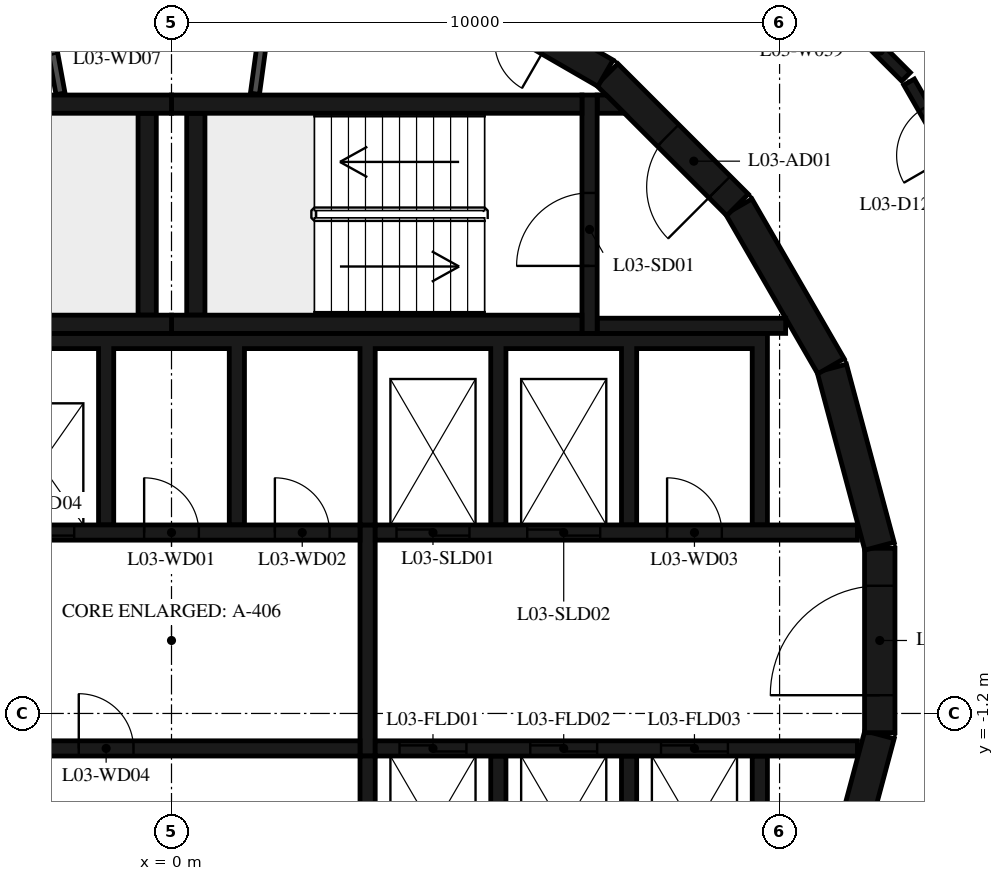
"""IFC4 building model, lengths in metres.
Left out: names, types, materials, properties, quantities, classifications, styles, units other than length and angle.
Written with IfcOpenShell. Run it as: python <this file> out.ifc"""

import sys

from ifc_helpers import new_model, si_unit, direction, frame, frame_2d, origin, place, context, subcontext, project, spatial, polyline, rectangle, outline, extrude, element, fill, save


model = new_model("IFC4")
c1 = context("Model", 3, precision=1e-05, world=origin(), true_north=direction((0.0, 1.0)))
c2 = subcontext(c1, "Body", "Model", "MODEL_VIEW")
j1 = project(units=[si_unit("LENGTHUNIT", "METRE"), si_unit("PLANEANGLEUNIT", "RADIAN")], contexts=[c1])
p1 = place(None, origin())
s1 = spatial("IfcSite", under=j1, at=p1, CompositionType="ELEMENT")
p2 = place(p1, origin())
s2 = spatial("IfcBuilding", under=s1, at=p2, CompositionType="ELEMENT")
p3 = place(p2, frame((0.0, 0.0, 18.6)))
s3 = spatial("IfcBuildingStorey", under=s2, at=p3, CompositionType="ELEMENT", Elevation=18.6)
p4 = place(p3, frame((10.858, -4.479, 0.0), z_axis=(0.0, 0.0, 1.0), x_axis=(0.258734743916, 0.965948410781, 0.0)))
e1 = element("IfcWall", 1, at=p4, inside=s3, PredefinedType="SHEAR", context=c2, shape_type="SweptSolid", body=[
    extrude(rectangle(XDim=3.033, YDim=0.5, at=frame_2d((1.516, 0.0))), origin(), (0.0, 0.0, 1.0), 4.42),
])
p5 = place(p3, frame((11.647, -1.516, 0.0), z_axis=(0.0, 0.0, 1.0), x_axis=(0.0, 1.0, 0.0)))
e2 = element("IfcWall", 2, at=p5, inside=s3, PredefinedType="SHEAR", context=c2, shape_type="SweptSolid", body=[
    extrude(rectangle(XDim=3.033, YDim=0.5, at=frame_2d((1.516, 0.0))), origin(), (0.0, 0.0, 1.0), 4.42),
])
p6 = place(p5, frame((0.616, 0.0, 0.0)))
e3 = element("IfcOpeningElement", 3, at=p6, cuts=e2, PredefinedType="OPENING", context=c2, shape_type="SweptSolid", body=[
    extrude(rectangle(XDim=1.8, YDim=2.1, at=frame_2d((0.9, 1.05))), frame((0.0, 0.26, 0.0), z_axis=(0.0, -1.0, 0.0), x_axis=(1.0, 0.0, 0.0)), (0.0, 0.0, 1.0), 0.52),
])
for number, where, z_axis, x_axis in (
    (4, (11.643, 1.55, 0.0), (0.0, 0.0, 1.0), (-0.259, 0.966, 0.0)),
    (5, (10.845, 4.51, 0.0), (0.0, 0.0, 1.0), (-0.5, 0.866, 0.0)),
):
    element("IfcWall", number, at=place(p3, frame(where, z_axis=z_axis, x_axis=x_axis)), inside=s3, PredefinedType="SHEAR", context=c2, shape_type="SweptSolid", body=[
        extrude(rectangle(XDim=3.033, YDim=0.5, at=frame_2d((1.516, 0.0))), origin(), (0.0, 0.0, 1.0), 4.42),
    ])
p7 = place(p3, frame((9.308, 7.164, 0.0), z_axis=(0.0, 0.0, 1.0), x_axis=(-0.707106781187, 0.707106781187, 0.0)))
e6 = element("IfcWall", 6, at=p7, inside=s3, PredefinedType="SHEAR", context=c2, shape_type="SweptSolid", body=[
    extrude(rectangle(XDim=3.032, YDim=0.5, at=frame_2d((1.516, 0.0))), origin(), (0.0, 0.0, 1.0), 4.42),
])
p8 = place(p7, frame((0.416, 0.0, 0.0)))
e7 = element("IfcOpeningElement", 7, at=p8, cuts=e6, PredefinedType="OPENING", context=c2, shape_type="SweptSolid", body=[
    extrude(rectangle(XDim=1.2, YDim=2.1, at=frame_2d((0.6, 1.05))), frame((0.0, 0.26, 0.0), z_axis=(0.0, -1.0, 0.0), x_axis=(1.0, 0.0, 0.0)), (0.0, 0.0, 1.0), 0.52),
])
p9 = place(p3, frame((7.137, 9.329, 0.0), z_axis=(0.0, 0.0, 1.0), x_axis=(-0.865975092491, 0.500087131594, 0.0)))
e8 = element("IfcWall", 8, at=p9, inside=s3, PredefinedType="SHEAR", context=c2, shape_type="SweptSolid", body=[
    extrude(rectangle(XDim=3.033, YDim=0.5, at=frame_2d((1.516, 0.0))), origin(), (0.0, 0.0, 1.0), 4.42),
])
p10 = place(p9, frame((1.066, 0.0, 0.0)))
e9 = element("IfcOpeningElement", 9, at=p10, cuts=e8, PredefinedType="OPENING", context=c2, shape_type="SweptSolid", body=[
    extrude(rectangle(XDim=0.9, YDim=2.1, at=frame_2d((0.45, 1.05))), frame((0.0, 0.26, 0.0), z_axis=(0.0, -1.0, 0.0), x_axis=(1.0, 0.0, 0.0)), (0.0, 0.0, 1.0), 0.52),
])
for number, where, z_axis, x_axis in (
    (10, (0.0, 5.2, 0.0), (0.0, 0.0, 1.0), (1.0, 0.0, 0.0)),
    (11, (0.0, 8.82, 0.0), (0.0, 0.0, 1.0), (1.0, 0.0, 0.0)),
):
    element("IfcWall", number, at=place(p3, frame(where, z_axis=z_axis, x_axis=x_axis)), inside=s3, PredefinedType="SHEAR", context=c2, shape_type="SweptSolid", body=[
        extrude(rectangle(XDim=6.75, YDim=0.3, at=frame_2d((3.375, 0.0))), origin(), (0.0, 0.0, 1.0), 4.42),
    ])
p11 = place(p3, frame((0.4, 5.35, 0.0), z_axis=(0.0, 0.0, 1.0), x_axis=(0.0, 1.0, 0.0)))
e12 = element("IfcWall", 12, at=p11, inside=s3, PredefinedType="SHEAR", context=c2, shape_type="SweptSolid", body=[
    extrude(rectangle(XDim=3.32, YDim=0.3, at=frame_2d((1.66, 0.0))), origin(), (0.0, 0.0, 1.0), 4.42),
])
p12 = place(p3, frame((6.875, 5.05, 0.0), z_axis=(0.0, 0.0, 1.0), x_axis=(0.0, 1.0, 0.0)))
e13 = element("IfcWall", 13, at=p12, inside=s3, PredefinedType="SHEAR", context=c2, shape_type="SweptSolid", body=[
    extrude(rectangle(XDim=3.92, YDim=0.25, at=frame_2d((1.96, 0.0))), origin(), (0.0, 0.0, 1.0), 4.42),
])
p13 = place(p12, frame((1.11, 0.0, 0.0)))
e14 = element("IfcOpeningElement", 14, at=p13, cuts=e13, PredefinedType="OPENING", context=c2, shape_type="SweptSolid", body=[
    extrude(rectangle(XDim=1.2, YDim=2.1, at=frame_2d((0.6, 1.05))), frame((0.0, 0.135, 0.0), z_axis=(0.0, -1.0, 0.0), x_axis=(1.0, 0.0, 0.0)), (0.0, 0.0, 1.0), 0.27),
])
p14 = place(p3, frame((7.0, 5.175, 0.0), z_axis=(0.0, 0.0, 1.0), x_axis=(1.0, 0.0, 0.0)))
e15 = element("IfcWall", 15, at=p14, inside=s3, PredefinedType="SHEAR", context=c2, shape_type="SweptSolid", body=[
    extrude(rectangle(XDim=3.1, YDim=0.25, at=frame_2d((1.55, 0.0))), origin(), (0.0, 0.0, 1.0), 4.42),
])
p15 = place(p3, origin())
e16 = element("IfcWall", 16, at=p15, inside=s3, PredefinedType="SHEAR", context=c2, shape_type="SweptSolid", body=[
    extrude(outline(polyline([(7.448, 8.67), (7.0, 8.67), (7.0, 8.97), (7.148, 8.97), (7.448, 8.67)])), origin(), (0.0, 0.0, 1.0), 4.42),
])
for number, where, z_axis, x_axis in (
    (17, (-6.75, 5.2, 0.0), (0.0, 0.0, 1.0), (1.0, 0.0, 0.0)),
    (18, (-6.75, 8.82, 0.0), (0.0, 0.0, 1.0), (1.0, 0.0, 0.0)),
):
    element("IfcWall", number, at=place(p3, frame(where, z_axis=z_axis, x_axis=x_axis)), inside=s3, PredefinedType="SHEAR", context=c2, shape_type="SweptSolid", body=[
        extrude(rectangle(XDim=6.75, YDim=0.3, at=frame_2d((3.375, 0.0))), origin(), (0.0, 0.0, 1.0), 4.42),
    ])
p16 = place(p3, frame((-0.4, 5.35, 0.0), z_axis=(0.0, 0.0, 1.0), x_axis=(0.0, 1.0, 0.0)))
e19 = element("IfcWall", 19, at=p16, inside=s3, PredefinedType="SHEAR", context=c2, shape_type="SweptSolid", body=[
    extrude(rectangle(XDim=3.32, YDim=0.3, at=frame_2d((1.66, 0.0))), origin(), (0.0, 0.0, 1.0), 4.42),
])
p17 = place(p3, origin())
e20 = element("IfcWall", 20, at=p17, inside=s3, PredefinedType="SHEAR", context=c2, shape_type="SweptSolid", body=[
    extrude(outline(polyline([(-9.55, 4.8), (-7.65, 4.8), (-7.65, 1.9), (-7.4, 1.9), (-7.4, 4.8), (-5.5, 4.8), (-5.5, 1.9), (-5.25, 1.9), (-5.25, 4.8), (-3.35, 4.8), (-3.35, 1.9), (-3.1, 1.9), (-3.1, 4.8), (-1.2, 4.8), (-1.2, 1.9), (-0.95, 1.9), (-0.95, 4.8), (0.95, 4.8), (0.95, 1.9), (1.2, 1.9), (1.2, 4.8), (3.1, 4.8), (3.1, 1.9), (3.35, 1.9), (3.35, 4.8), (5.25, 4.8), (5.25, 1.9), (5.5, 1.9), (5.5, 4.8), (7.4, 4.8), (7.4, 1.9), (7.65, 1.9), (7.65, 4.8), (9.55, 4.8), (9.55, 1.9), (9.8, 1.9), (9.8, 4.8), (9.8, 5.05), (-9.8, 5.05), (-9.8, 4.8), (-9.8, 1.9), (-9.55, 1.9), (-9.55, 4.8)])), origin(), (0.0, 0.0, 1.0), 4.42),
])
p18 = place(p3, origin())
e21 = element("IfcWall", 21, at=p18, inside=s3, PredefinedType="SHEAR", context=c2, shape_type="SweptSolid", body=[
    extrude(outline(polyline([(9.8, -5.05), (9.8, -4.8), (9.8, -1.9), (9.55, -1.9), (9.55, -4.8), (7.65, -4.8), (7.65, -1.9), (7.4, -1.9), (7.4, -4.8), (5.5, -4.8), (5.5, -1.9), (5.25, -1.9), (5.25, -4.8), (3.35, -4.8), (3.35, -1.9), (3.1, -1.9), (3.1, -4.8), (-5.25, -4.8), (-5.25, -1.9), (-5.5, -1.9), (-5.5, -4.8), (-7.4, -4.8), (-7.4, -1.9), (-7.65, -1.9), (-7.65, -4.8), (-9.55, -4.8), (-9.55, -1.9), (-9.8, -1.9), (-9.8, -4.8), (-9.8, -5.05), (9.8, -5.05)])), origin(), (0.0, 0.0, 1.0), 4.42),
])
p19 = place(p3, frame((-11.28, 1.775, 0.0), z_axis=(0.0, 0.0, 1.0), x_axis=(1.0, 0.0, 0.0)))
e22 = element("IfcWall", 22, at=p19, inside=s3, PredefinedType="SHEAR", context=c2, shape_type="SweptSolid", body=[
    extrude(rectangle(XDim=14.38, YDim=0.25, at=frame_2d((7.19, 0.0))), origin(), (0.0, 0.0, 1.0), 4.42),
])
p20 = place(p19, frame((2.13, 0.0, 0.0)))
e23 = element("IfcOpeningElement", 23, at=p20, cuts=e22, PredefinedType="OPENING", context=c2, shape_type="SweptSolid", body=[
    extrude(rectangle(XDim=1.1, YDim=2.1, at=frame_2d((0.55, 1.05))), frame((0.0, 0.135, 0.0), z_axis=(0.0, -1.0, 0.0), x_axis=(1.0, 0.0, 0.0)), (0.0, 0.0, 1.0), 0.27),
])
p21 = place(p19, frame((4.28, 0.0, 0.0)))
e24 = element("IfcOpeningElement", 24, at=p21, cuts=e22, PredefinedType="OPENING", context=c2, shape_type="SweptSolid", body=[
    extrude(rectangle(XDim=1.1, YDim=2.1, at=frame_2d((0.55, 1.05))), frame((0.0, 0.135, 0.0), z_axis=(0.0, -1.0, 0.0), x_axis=(1.0, 0.0, 0.0)), (0.0, 0.0, 1.0), 0.27),
])
p22 = place(p19, frame((6.43, 0.0, 0.0)))
e25 = element("IfcOpeningElement", 25, at=p22, cuts=e22, PredefinedType="OPENING", context=c2, shape_type="SweptSolid", body=[
    extrude(rectangle(XDim=1.1, YDim=2.1, at=frame_2d((0.55, 1.05))), frame((0.0, 0.135, 0.0), z_axis=(0.0, -1.0, 0.0), x_axis=(1.0, 0.0, 0.0)), (0.0, 0.0, 1.0), 0.27),
])
p23 = place(p19, frame((8.58, 0.0, 0.0)))
e26 = element("IfcOpeningElement", 26, at=p23, cuts=e22, PredefinedType="OPENING", context=c2, shape_type="SweptSolid", body=[
    extrude(rectangle(XDim=1.1, YDim=2.1, at=frame_2d((0.55, 1.05))), frame((0.0, 0.135, 0.0), z_axis=(0.0, -1.0, 0.0), x_axis=(1.0, 0.0, 0.0)), (0.0, 0.0, 1.0), 0.27),
])
p24 = place(p19, frame((10.83, 0.0, 0.0)))
e27 = element("IfcOpeningElement", 27, at=p24, cuts=e22, PredefinedType="OPENING", context=c2, shape_type="SweptSolid", body=[
    extrude(rectangle(XDim=0.9, YDim=2.1, at=frame_2d((0.45, 1.05))), frame((0.0, 0.135, 0.0), z_axis=(0.0, -1.0, 0.0), x_axis=(1.0, 0.0, 0.0)), (0.0, 0.0, 1.0), 0.27),
])
p25 = place(p19, frame((12.98, 0.0, 0.0)))
e28 = element("IfcOpeningElement", 28, at=p25, cuts=e22, PredefinedType="OPENING", context=c2, shape_type="SweptSolid", body=[
    extrude(rectangle(XDim=0.9, YDim=2.1, at=frame_2d((0.45, 1.05))), frame((0.0, 0.135, 0.0), z_axis=(0.0, -1.0, 0.0), x_axis=(1.0, 0.0, 0.0)), (0.0, 0.0, 1.0), 0.27),
])
p26 = place(p3, frame((3.35, 1.775, 0.0), z_axis=(0.0, 0.0, 1.0), x_axis=(1.0, 0.0, 0.0)))
e29 = element("IfcWall", 29, at=p26, inside=s3, PredefinedType="SHEAR", context=c2, shape_type="SweptSolid", body=[
    extrude(rectangle(XDim=7.93, YDim=0.25, at=frame_2d((3.965, 0.0))), origin(), (0.0, 0.0, 1.0), 4.42),
])
p27 = place(p26, frame((0.35, 0.0, 0.0)))
e30 = element("IfcOpeningElement", 30, at=p27, cuts=e29, PredefinedType="OPENING", context=c2, shape_type="SweptSolid", body=[
    extrude(rectangle(XDim=1.2, YDim=2.4, at=frame_2d((0.6, 1.2))), frame((0.0, 0.135, 0.0), z_axis=(0.0, -1.0, 0.0), x_axis=(1.0, 0.0, 0.0)), (0.0, 0.0, 1.0), 0.27),
])
p28 = place(p26, frame((2.5, 0.0, 0.0)))
e31 = element("IfcOpeningElement", 31, at=p28, cuts=e29, PredefinedType="OPENING", context=c2, shape_type="SweptSolid", body=[
    extrude(rectangle(XDim=1.2, YDim=2.4, at=frame_2d((0.6, 1.2))), frame((0.0, 0.135, 0.0), z_axis=(0.0, -1.0, 0.0), x_axis=(1.0, 0.0, 0.0)), (0.0, 0.0, 1.0), 0.27),
])
p29 = place(p26, frame((4.8, 0.0, 0.0)))
e32 = element("IfcOpeningElement", 32, at=p29, cuts=e29, PredefinedType="OPENING", context=c2, shape_type="SweptSolid", body=[
    extrude(rectangle(XDim=0.9, YDim=2.1, at=frame_2d((0.45, 1.05))), frame((0.0, 0.135, 0.0), z_axis=(0.0, -1.0, 0.0), x_axis=(1.0, 0.0, 0.0)), (0.0, 0.0, 1.0), 0.27),
])
p30 = place(p3, frame((-11.28, -1.775, 0.0), z_axis=(0.0, 0.0, 1.0), x_axis=(1.0, 0.0, 0.0)))
e33 = element("IfcWall", 33, at=p30, inside=s3, PredefinedType="SHEAR", context=c2, shape_type="SweptSolid", body=[
    extrude(rectangle(XDim=14.38, YDim=0.25, at=frame_2d((7.19, 0.0))), origin(), (0.0, 0.0, 1.0), 4.42),
])
p31 = place(p30, frame((9.755, 0.0, 0.0)))
e34 = element("IfcOpeningElement", 34, at=p31, cuts=e33, PredefinedType="OPENING", context=c2, shape_type="SweptSolid", body=[
    extrude(rectangle(XDim=0.9, YDim=2.1, at=frame_2d((0.45, 1.05))), frame((0.0, 0.135, 0.0), z_axis=(0.0, -1.0, 0.0), x_axis=(1.0, 0.0, 0.0)), (0.0, 0.0, 1.0), 0.27),
])
p32 = place(p3, frame((3.35, -1.775, 0.0), z_axis=(0.0, 0.0, 1.0), x_axis=(1.0, 0.0, 0.0)))
e35 = element("IfcWall", 35, at=p32, inside=s3, PredefinedType="SHEAR", context=c2, shape_type="SweptSolid", body=[
    extrude(rectangle(XDim=7.93, YDim=0.25, at=frame_2d((3.965, 0.0))), origin(), (0.0, 0.0, 1.0), 4.42),
])
p33 = place(p32, frame((0.4, 0.0, 0.0)))
e36 = element("IfcOpeningElement", 36, at=p33, cuts=e35, PredefinedType="OPENING", context=c2, shape_type="SweptSolid", body=[
    extrude(rectangle(XDim=1.1, YDim=2.4, at=frame_2d((0.55, 1.2))), frame((0.0, 0.135, 0.0), z_axis=(0.0, -1.0, 0.0), x_axis=(1.0, 0.0, 0.0)), (0.0, 0.0, 1.0), 0.27),
])
p34 = place(p32, frame((2.55, 0.0, 0.0)))
e37 = element("IfcOpeningElement", 37, at=p34, cuts=e35, PredefinedType="OPENING", context=c2, shape_type="SweptSolid", body=[
    extrude(rectangle(XDim=1.1, YDim=2.4, at=frame_2d((0.55, 1.2))), frame((0.0, 0.135, 0.0), z_axis=(0.0, -1.0, 0.0), x_axis=(1.0, 0.0, 0.0)), (0.0, 0.0, 1.0), 0.27),
])
p35 = place(p32, frame((4.7, 0.0, 0.0)))
e38 = element("IfcOpeningElement", 38, at=p35, cuts=e35, PredefinedType="OPENING", context=c2, shape_type="SweptSolid", body=[
    extrude(rectangle(XDim=1.1, YDim=2.4, at=frame_2d((0.55, 1.2))), frame((0.0, 0.135, 0.0), z_axis=(0.0, -1.0, 0.0), x_axis=(1.0, 0.0, 0.0)), (0.0, 0.0, 1.0), 0.27),
])
p36 = place(p3, frame((3.225, -1.9, 0.0), z_axis=(0.0, 0.0, 1.0), x_axis=(0.0, 1.0, 0.0)))
e39 = element("IfcWall", 39, at=p36, inside=s3, PredefinedType="SHEAR", context=c2, shape_type="SweptSolid", body=[
    extrude(rectangle(XDim=3.8, YDim=0.25, at=frame_2d((1.9, 0.0))), origin(), (0.0, 0.0, 1.0), 4.42),
])
p37 = place(p3, frame((1.691, 11.326, 0.0), z_axis=(0.0, 0.0, 1.0), x_axis=(-0.135344253201, -0.990798633994, 0.0)))
e40 = element("IfcWall", 40, at=p37, inside=s3, PredefinedType="PARTITIONING", context=c2, shape_type="SweptSolid", body=[
    extrude(rectangle(XDim=2.358, YDim=0.15, at=frame_2d((1.179, 0.0))), origin(), (0.0, 0.0, 1.0), 4.42),
])
p38 = place(p37, frame((0.729, 0.0, 0.0)))
e41 = element("IfcOpeningElement", 41, at=p38, cuts=e40, PredefinedType="OPENING", context=c2, shape_type="SweptSolid", body=[
    extrude(rectangle(XDim=0.9, YDim=2.1, at=frame_2d((0.45, 1.05))), frame((0.0, 0.085, 0.0), z_axis=(0.0, -1.0, 0.0), x_axis=(1.0, 0.0, 0.0)), (0.0, 0.0, 1.0), 0.17),
])
p39 = place(p3, frame((-1.825, 8.99, 0.0), z_axis=(0.0, 0.0, 1.0), x_axis=(-0.179955206115, 0.983674805915, 0.0)))
e42 = element("IfcWall", 42, at=p39, inside=s3, PredefinedType="PARTITIONING", context=c2, shape_type="SweptSolid", body=[
    extrude(rectangle(XDim=2.229, YDim=0.15, at=frame_2d((1.115, 0.0))), origin(), (0.0, 0.0, 1.0), 4.42),
])
p40 = place(p39, frame((0.665, 0.0, 0.0)))
e43 = element("IfcOpeningElement", 43, at=p40, cuts=e42, PredefinedType="OPENING", context=c2, shape_type="SweptSolid", body=[
    extrude(rectangle(XDim=0.9, YDim=2.1, at=frame_2d((0.45, 1.05))), frame((0.0, 0.085, 0.0), z_axis=(0.0, -1.0, 0.0), x_axis=(1.0, 0.0, 0.0)), (0.0, 0.0, 1.0), 0.17),
])
p41 = place(p3, frame((12.08, 9.27, 0.0), z_axis=(0.0, 0.0, 1.0), x_axis=(-0.707106781187, 0.707106781187, 0.0)))
e44 = element("IfcWall", 44, at=p41, inside=s3, PredefinedType="PARTITIONING", context=c2, shape_type="SweptSolid", body=[
    extrude(rectangle(XDim=1.202, YDim=0.2, at=frame_2d((0.601, 0.0))), origin(), (0.0, 0.0, 1.0), 4.42),
])
p42 = place(p3, frame((13.07, 7.55, 0.0), z_axis=(0.0, 0.0, 1.0), x_axis=(-0.498884838469, 0.866668285993, 0.0)))
e45 = element("IfcWall", 45, at=p42, inside=s3, PredefinedType="PARTITIONING", context=c2, shape_type="SweptSolid", body=[
    extrude(rectangle(XDim=1.885, YDim=0.2, at=frame_2d((0.942, 0.0))), origin(), (0.0, 0.0, 1.0), 4.42),
])
p43 = place(p42, frame((0.492, 0.0, 0.0)))
e46 = element("IfcOpeningElement", 46, at=p43, cuts=e45, PredefinedType="OPENING", context=c2, shape_type="SweptSolid", body=[
    extrude(rectangle(XDim=0.9, YDim=2.1, at=frame_2d((0.45, 1.05))), frame((0.0, 0.11, 0.0), z_axis=(0.0, -1.0, 0.0), x_axis=(1.0, 0.0, 0.0)), (0.0, 0.0, 1.0), 0.22),
])
p44 = place(p13, origin())
e47 = element("IfcDoor", 47, at=p44, inside=s3, OperationType="SINGLE_SWING_LEFT", PredefinedType="DOOR", context=c2, shape_type="SweptSolid", body=[
    extrude(rectangle(XDim=1.2, YDim=2.1, at=frame_2d((0.6, 1.05))), frame((0.0, 0.025, 0.0), z_axis=(0.0, -1.0, 0.0), x_axis=(1.0, 0.0, 0.0)), (0.0, 0.0, 1.0), 0.05),
])
fill(e14, e47)
p45 = place(p8, origin())
e48 = element("IfcDoor", 48, at=p45, inside=s3, OperationType="SINGLE_SWING_RIGHT", PredefinedType="DOOR", context=c2, shape_type="SweptSolid", body=[
    extrude(rectangle(XDim=1.2, YDim=2.1, at=frame_2d((0.6, 1.05))), frame((0.0, 0.025, 0.0), z_axis=(0.0, -1.0, 0.0), x_axis=(1.0, 0.0, 0.0)), (0.0, 0.0, 1.0), 0.05),
])
fill(e7, e48)
p46 = place(p6, origin())
e49 = element("IfcDoor", 49, at=p46, inside=s3, OperationType="DOUBLE_DOOR_SINGLE_SWING", PredefinedType="DOOR", context=c2, shape_type="SweptSolid", body=[
    extrude(rectangle(XDim=1.8, YDim=2.1, at=frame_2d((0.9, 1.05))), frame((0.0, 0.025, 0.0), z_axis=(0.0, -1.0, 0.0), x_axis=(1.0, 0.0, 0.0)), (0.0, 0.0, 1.0), 0.05),
])
fill(e3, e49)
p47 = place(p23, origin())
e50 = element("IfcDoor", 50, at=p47, inside=s3, OperationType="DOUBLE_DOOR_SLIDING", PredefinedType="DOOR", context=c2, shape_type="SweptSolid", body=[
    extrude(rectangle(XDim=1.1, YDim=2.1, at=frame_2d((0.55, 1.05))), frame((0.0, 0.025, 0.0), z_axis=(0.0, -1.0, 0.0), x_axis=(1.0, 0.0, 0.0)), (0.0, 0.0, 1.0), 0.05),
])
fill(e26, e50)
p48 = place(p27, origin())
e51 = element("IfcDoor", 51, at=p48, inside=s3, OperationType="DOUBLE_DOOR_SLIDING", PredefinedType="DOOR", context=c2, shape_type="SweptSolid", body=[
    extrude(rectangle(XDim=1.2, YDim=2.4, at=frame_2d((0.6, 1.2))), frame((0.0, 0.025, 0.0), z_axis=(0.0, -1.0, 0.0), x_axis=(1.0, 0.0, 0.0)), (0.0, 0.0, 1.0), 0.05),
])
fill(e30, e51)
p49 = place(p28, origin())
e52 = element("IfcDoor", 52, at=p49, inside=s3, OperationType="DOUBLE_DOOR_SLIDING", PredefinedType="DOOR", context=c2, shape_type="SweptSolid", body=[
    extrude(rectangle(XDim=1.2, YDim=2.4, at=frame_2d((0.6, 1.2))), frame((0.0, 0.025, 0.0), z_axis=(0.0, -1.0, 0.0), x_axis=(1.0, 0.0, 0.0)), (0.0, 0.0, 1.0), 0.05),
])
fill(e31, e52)
p50 = place(p33, origin())
e53 = element("IfcDoor", 53, at=p50, inside=s3, OperationType="DOUBLE_DOOR_SLIDING", PredefinedType="DOOR", context=c2, shape_type="SweptSolid", body=[
    extrude(rectangle(XDim=1.1, YDim=2.4, at=frame_2d((0.55, 1.2))), frame((0.0, 0.025, 0.0), z_axis=(0.0, -1.0, 0.0), x_axis=(1.0, 0.0, 0.0)), (0.0, 0.0, 1.0), 0.05),
])
fill(e36, e53)
p51 = place(p34, origin())
e54 = element("IfcDoor", 54, at=p51, inside=s3, OperationType="DOUBLE_DOOR_SLIDING", PredefinedType="DOOR", context=c2, shape_type="SweptSolid", body=[
    extrude(rectangle(XDim=1.1, YDim=2.4, at=frame_2d((0.55, 1.2))), frame((0.0, 0.025, 0.0), z_axis=(0.0, -1.0, 0.0), x_axis=(1.0, 0.0, 0.0)), (0.0, 0.0, 1.0), 0.05),
])
fill(e37, e54)
p52 = place(p35, origin())
e55 = element("IfcDoor", 55, at=p52, inside=s3, OperationType="DOUBLE_DOOR_SLIDING", PredefinedType="DOOR", context=c2, shape_type="SweptSolid", body=[
    extrude(rectangle(XDim=1.1, YDim=2.4, at=frame_2d((0.55, 1.2))), frame((0.0, 0.025, 0.0), z_axis=(0.0, -1.0, 0.0), x_axis=(1.0, 0.0, 0.0)), (0.0, 0.0, 1.0), 0.05),
])
fill(e38, e55)
p53 = place(p24, origin())
e56 = element("IfcDoor", 56, at=p53, inside=s3, OperationType="SINGLE_SWING_RIGHT", PredefinedType="DOOR", context=c2, shape_type="SweptSolid", body=[
    extrude(rectangle(XDim=0.9, YDim=2.1, at=frame_2d((0.45, 1.05))), frame((0.0, 0.025, 0.0), z_axis=(0.0, -1.0, 0.0), x_axis=(1.0, 0.0, 0.0)), (0.0, 0.0, 1.0), 0.05),
])
fill(e27, e56)
p54 = place(p25, origin())
e57 = element("IfcDoor", 57, at=p54, inside=s3, OperationType="SINGLE_SWING_LEFT", PredefinedType="DOOR", context=c2, shape_type="SweptSolid", body=[
    extrude(rectangle(XDim=0.9, YDim=2.1, at=frame_2d((0.45, 1.05))), frame((0.0, 0.025, 0.0), z_axis=(0.0, -1.0, 0.0), x_axis=(1.0, 0.0, 0.0)), (0.0, 0.0, 1.0), 0.05),
])
fill(e28, e57)
p55 = place(p29, origin())
e58 = element("IfcDoor", 58, at=p55, inside=s3, OperationType="SINGLE_SWING_RIGHT", PredefinedType="DOOR", context=c2, shape_type="SweptSolid", body=[
    extrude(rectangle(XDim=0.9, YDim=2.1, at=frame_2d((0.45, 1.05))), frame((0.0, 0.025, 0.0), z_axis=(0.0, -1.0, 0.0), x_axis=(1.0, 0.0, 0.0)), (0.0, 0.0, 1.0), 0.05),
])
fill(e32, e58)
p56 = place(p31, origin())
e59 = element("IfcDoor", 59, at=p56, inside=s3, OperationType="SINGLE_SWING_LEFT", PredefinedType="DOOR", context=c2, shape_type="SweptSolid", body=[
    extrude(rectangle(XDim=0.9, YDim=2.1, at=frame_2d((0.45, 1.05))), frame((0.0, 0.025, 0.0), z_axis=(0.0, -1.0, 0.0), x_axis=(1.0, 0.0, 0.0)), (0.0, 0.0, 1.0), 0.05),
])
fill(e34, e59)
p57 = place(p40, origin())
e60 = element("IfcDoor", 60, at=p57, inside=s3, OperationType="SINGLE_SWING_RIGHT", PredefinedType="DOOR", context=c2, shape_type="SweptSolid", body=[
    extrude(rectangle(XDim=0.9, YDim=2.1, at=frame_2d((0.45, 1.05))), frame((0.0, 0.025, 0.0), z_axis=(0.0, -1.0, 0.0), x_axis=(1.0, 0.0, 0.0)), (0.0, 0.0, 1.0), 0.05),
])
fill(e43, e60)
p58 = place(p43, origin())
e61 = element("IfcDoor", 61, at=p58, inside=s3, OperationType="SINGLE_SWING_LEFT", PredefinedType="DOOR", context=c2, shape_type="SweptSolid", body=[
    extrude(rectangle(XDim=0.9, YDim=2.1, at=frame_2d((0.45, 1.05))), frame((0.0, 0.025, 0.0), z_axis=(0.0, -1.0, 0.0), x_axis=(1.0, 0.0, 0.0)), (0.0, 0.0, 1.0), 0.05),
])
fill(e46, e61)
save(model, sys.argv[1])
